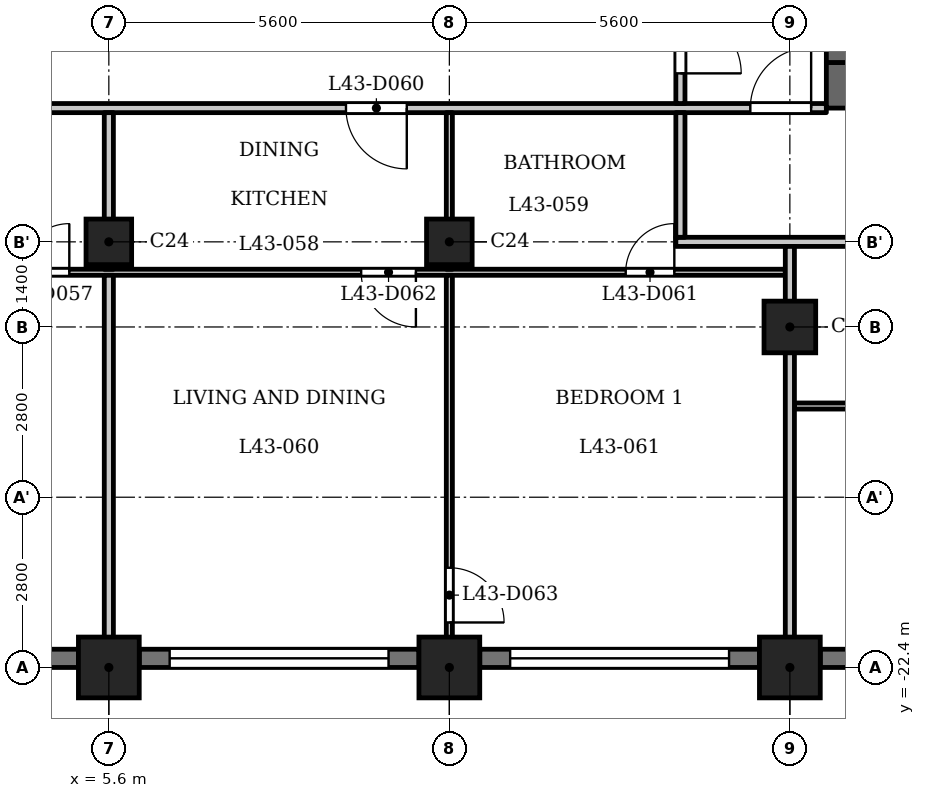
"""IFC4 building model, lengths in metres.
Left out: names, types, materials, properties, quantities, classifications, styles, units other than length and angle.
Written with IfcOpenShell. Run it as: python <this file> out.ifc"""

import sys

from ifc_helpers import new_model, si_unit, direction, frame, frame_2d, origin, origin_2d, place, context, subcontext, project, spatial, rectangle, extrude, element, fill, save


model = new_model("IFC4")
c1 = context("Model", 3, precision=1e-05, world=origin(), true_north=direction((0.0, 1.0)))
c2 = subcontext(c1, "Body", "Model", "MODEL_VIEW")
j1 = project(units=[si_unit("LENGTHUNIT", "METRE"), si_unit("PLANEANGLEUNIT", "RADIAN")], contexts=[c1])
p1 = place(None, origin())
s1 = spatial("IfcSite", under=j1, at=p1, CompositionType="ELEMENT")
p2 = place(p1, origin())
s2 = spatial("IfcBuilding", under=s1, at=p2, CompositionType="ELEMENT")
p3 = place(p2, frame((0.0, 0.0, 167.6)))
s3 = spatial("IfcBuildingStorey", under=s2, at=p3, CompositionType="ELEMENT", Elevation=167.6)
for number, where, z_axis, x_axis in (
    (1, (5.6, -22.4, 0.0), (0.0, 0.0, 1.0), (1.0, 0.0, 0.0)),
    (2, (11.2, -22.4, 0.0), (0.0, 0.0, 1.0), (1.0, 0.0, 0.0)),
    (3, (16.8, -22.4, 0.0), (0.0, 0.0, 1.0), (1.0, 0.0, 0.0)),
):
    element("IfcColumn", number, at=place(p3, frame(where, z_axis=z_axis, x_axis=x_axis)), inside=s3, PredefinedType="COLUMN", context=c2, shape_type="SweptSolid", body=[
        extrude(rectangle(XDim=1.0, YDim=1.0, at=origin_2d()), origin(), (0.0, 0.0, 1.0), 3.5),
    ])
p4 = place(p3, frame((16.8, -16.8, 0.0), z_axis=(0.0, 0.0, 1.0), x_axis=(1.0, 0.0, 0.0)))
e4 = element("IfcColumn", 4, at=p4, inside=s3, PredefinedType="COLUMN", context=c2, shape_type="SweptSolid", body=[
    extrude(rectangle(XDim=0.85, YDim=0.85, at=origin_2d()), origin(), (0.0, 0.0, 1.0), 3.5),
])
for number, where, z_axis, x_axis in (
    (5, (5.6, -15.4, 0.0), (0.0, 0.0, 1.0), (1.0, 0.0, 0.0)),
    (6, (11.2, -15.4, 0.0), (0.0, 0.0, 1.0), (1.0, 0.0, 0.0)),
):
    element("IfcColumn", number, at=place(p3, frame(where, z_axis=z_axis, x_axis=x_axis)), inside=s3, PredefinedType="COLUMN", context=c2, shape_type="SweptSolid", body=[
        extrude(rectangle(XDim=0.75, YDim=0.75, at=origin_2d()), origin(), (0.0, 0.0, 1.0), 3.5),
    ])
p5 = place(p3, frame((0.5, -22.25, 0.0), z_axis=(0.0, 0.0, 1.0), x_axis=(1.0, 0.0, 0.0)))
e7 = element("IfcWall", 7, at=p5, inside=s3, PredefinedType="SOLIDWALL", context=c2, shape_type="SweptSolid", body=[
    extrude(rectangle(XDim=4.6, YDim=0.3, at=frame_2d((2.3, 0.0))), origin(), (0.0, 0.0, 1.0), 2.45),
])
p6 = place(p5, frame((0.5, 0.0, 1.2)))
e8 = element("IfcOpeningElement", 8, at=p6, cuts=e7, PredefinedType="OPENING", context=c2, shape_type="SweptSolid", body=[
    extrude(rectangle(XDim=3.6, YDim=0.95, at=frame_2d((1.8, 0.475))), frame((0.0, 0.16, 0.0), z_axis=(0.0, -1.0, 0.0), x_axis=(1.0, 0.0, 0.0)), (0.0, 0.0, 1.0), 0.32),
])
p7 = place(p3, frame((6.1, -22.25, 0.0), z_axis=(0.0, 0.0, 1.0), x_axis=(1.0, 0.0, 0.0)))
e9 = element("IfcWall", 9, at=p7, inside=s3, PredefinedType="SOLIDWALL", context=c2, shape_type="SweptSolid", body=[
    extrude(rectangle(XDim=4.6, YDim=0.3, at=frame_2d((2.3, 0.0))), origin(), (0.0, 0.0, 1.0), 2.45),
])
p8 = place(p7, frame((0.5, 0.0, 1.2)))
e10 = element("IfcOpeningElement", 10, at=p8, cuts=e9, PredefinedType="OPENING", context=c2, shape_type="SweptSolid", body=[
    extrude(rectangle(XDim=3.6, YDim=0.95, at=frame_2d((1.8, 0.475))), frame((0.0, 0.16, 0.0), z_axis=(0.0, -1.0, 0.0), x_axis=(1.0, 0.0, 0.0)), (0.0, 0.0, 1.0), 0.32),
])
p9 = place(p3, frame((11.7, -22.25, 0.0), z_axis=(0.0, 0.0, 1.0), x_axis=(1.0, 0.0, 0.0)))
e11 = element("IfcWall", 11, at=p9, inside=s3, PredefinedType="SOLIDWALL", context=c2, shape_type="SweptSolid", body=[
    extrude(rectangle(XDim=4.6, YDim=0.3, at=frame_2d((2.3, 0.0))), origin(), (0.0, 0.0, 1.0), 2.45),
])
p10 = place(p9, frame((0.5, 0.0, 1.2)))
e12 = element("IfcOpeningElement", 12, at=p10, cuts=e11, PredefinedType="OPENING", context=c2, shape_type="SweptSolid", body=[
    extrude(rectangle(XDim=3.6, YDim=0.95, at=frame_2d((1.8, 0.475))), frame((0.0, 0.16, 0.0), z_axis=(0.0, -1.0, 0.0), x_axis=(1.0, 0.0, 0.0)), (0.0, 0.0, 1.0), 0.32),
])
p11 = place(p3, frame((17.3, -22.25, 0.0), z_axis=(0.0, 0.0, 1.0), x_axis=(1.0, 0.0, 0.0)))
e13 = element("IfcWall", 13, at=p11, inside=s3, PredefinedType="SOLIDWALL", context=c2, shape_type="SweptSolid", body=[
    extrude(rectangle(XDim=2.7, YDim=0.3, at=frame_2d((1.35, 0.0))), origin(), (0.0, 0.0, 1.0), 2.45),
])
p12 = place(p11, frame((0.45, 0.0, 0.9)))
e14 = element("IfcOpeningElement", 14, at=p12, cuts=e13, PredefinedType="OPENING", context=c2, shape_type="SweptSolid", body=[
    extrude(rectangle(XDim=1.8, YDim=1.25, at=frame_2d((0.9, 0.625))), frame((0.0, 0.16, 0.0), z_axis=(0.0, -1.0, 0.0), x_axis=(1.0, 0.0, 0.0)), (0.0, 0.0, 1.0), 0.32),
])
p13 = place(p3, frame((17.4, -12.825, 0.0), z_axis=(0.0, 0.0, 1.0), x_axis=(1.0, 0.0, 0.0)))
e15 = element("IfcWall", 15, at=p13, inside=s3, PredefinedType="SHEAR", context=c2, shape_type="SweptSolid", body=[
    extrude(rectangle(XDim=10.4, YDim=0.75, at=frame_2d((5.2, 0.0))), origin(), (0.0, 0.0, 1.0), 3.2),
])
p14 = place(p3, frame((17.6, -12.45, 0.0), z_axis=(0.0, 0.0, 1.0), x_axis=(0.0, 1.0, 0.0)))
e16 = element("IfcWall", 16, at=p14, inside=s3, PredefinedType="SHEAR", context=c2, shape_type="SweptSolid", body=[
    extrude(rectangle(XDim=24.9, YDim=0.4, at=frame_2d((12.45, 0.0))), origin(), (0.0, 0.0, 1.0), 3.2),
])
p15 = place(p14, frame((8.65, 0.0, 0.0)))
e17 = element("IfcOpeningElement", 17, at=p15, cuts=e16, PredefinedType="OPENING", context=c2, shape_type="SweptSolid", body=[
    extrude(rectangle(XDim=0.9, YDim=2.1, at=frame_2d((0.45, 1.05))), frame((0.0, 0.21, 0.0), z_axis=(0.0, -1.0, 0.0), x_axis=(1.0, 0.0, 0.0)), (0.0, 0.0, 1.0), 0.42),
])
p16 = place(p14, frame((15.6, 0.0, 0.0)))
e18 = element("IfcOpeningElement", 18, at=p16, cuts=e16, PredefinedType="OPENING", context=c2, shape_type="SweptSolid", body=[
    extrude(rectangle(XDim=1.1, YDim=2.1, at=frame_2d((0.55, 1.05))), frame((0.0, 0.21, 0.0), z_axis=(0.0, -1.0, 0.0), x_axis=(1.0, 0.0, 0.0)), (0.0, 0.0, 1.0), 0.42),
])
p17 = place(p14, frame((18.0, 0.0, 0.0)))
e19 = element("IfcOpeningElement", 19, at=p17, cuts=e16, PredefinedType="OPENING", context=c2, shape_type="SweptSolid", body=[
    extrude(rectangle(XDim=1.1, YDim=2.1, at=frame_2d((0.55, 1.05))), frame((0.0, 0.21, 0.0), z_axis=(0.0, -1.0, 0.0), x_axis=(1.0, 0.0, 0.0)), (0.0, 0.0, 1.0), 0.42),
])
p18 = place(p14, frame((23.025, 0.0, 0.0)))
e20 = element("IfcOpeningElement", 20, at=p18, cuts=e16, PredefinedType="OPENING", context=c2, shape_type="SweptSolid", body=[
    extrude(rectangle(XDim=1.1, YDim=2.1, at=frame_2d((0.55, 1.05))), frame((0.0, 0.21, 0.0), z_axis=(0.0, -1.0, 0.0), x_axis=(1.0, 0.0, 0.0)), (0.0, 0.0, 1.0), 0.42),
])
p19 = place(p14, frame((0.775, 0.0, 0.0)))
e21 = element("IfcOpeningElement", 21, at=p19, cuts=e16, PredefinedType="OPENING", context=c2, shape_type="SweptSolid", body=[
    extrude(rectangle(XDim=1.1, YDim=2.1, at=frame_2d((0.55, 1.05))), frame((0.0, 0.21, 0.0), z_axis=(0.0, -1.0, 0.0), x_axis=(1.0, 0.0, 0.0)), (0.0, 0.0, 1.0), 0.42),
])
p20 = place(p14, frame((12.925, 0.0, 0.0)))
e22 = element("IfcOpeningElement", 22, at=p20, cuts=e16, PredefinedType="OPENING", context=c2, shape_type="SweptSolid", body=[
    extrude(rectangle(XDim=1.8, YDim=2.1, at=frame_2d((0.9, 1.05))), frame((0.0, 0.21, 0.0), z_axis=(0.0, -1.0, 0.0), x_axis=(1.0, 0.0, 0.0)), (0.0, 0.0, 1.0), 0.42),
])
p21 = place(p3, frame((16.875, -18.1, 0.0), z_axis=(0.0, 0.0, 1.0), x_axis=(1.0, 0.0, 0.0)))
e23 = element("IfcWall", 23, at=p21, inside=s3, PredefinedType="PARTITIONING", context=c2, shape_type="SweptSolid", body=[
    extrude(rectangle(XDim=9.565, YDim=0.1, at=frame_2d((4.782, 0.0))), origin(), (0.0, 0.0, 1.0), 3.2),
])
p22 = place(p21, frame((7.639, 0.0, 0.0)))
e24 = element("IfcOpeningElement", 24, at=p22, cuts=e23, PredefinedType="OPENING", context=c2, shape_type="SweptSolid", body=[
    extrude(rectangle(XDim=0.8, YDim=2.1, at=frame_2d((0.4, 1.05))), frame((0.0, 0.06, 0.0), z_axis=(0.0, -1.0, 0.0), x_axis=(1.0, 0.0, 0.0)), (0.0, 0.0, 1.0), 0.12),
])
p23 = place(p21, frame((4.075, 0.0, 0.0)))
e25 = element("IfcOpeningElement", 25, at=p23, cuts=e23, PredefinedType="OPENING", context=c2, shape_type="SweptSolid", body=[
    extrude(rectangle(XDim=0.9, YDim=2.1, at=frame_2d((0.45, 1.05))), frame((0.0, 0.06, 0.0), z_axis=(0.0, -1.0, 0.0), x_axis=(1.0, 0.0, 0.0)), (0.0, 0.0, 1.0), 0.12),
])
p24 = place(p3, frame((-16.725, -15.9, 0.0), z_axis=(0.0, 0.0, 1.0), x_axis=(1.0, 0.0, 0.0)))
e26 = element("IfcWall", 26, at=p24, inside=s3, PredefinedType="PARTITIONING", context=c2, shape_type="SweptSolid", body=[
    extrude(rectangle(XDim=33.45, YDim=0.1, at=frame_2d((16.725, 0.0))), origin(), (0.0, 0.0, 1.0), 3.2),
])
p25 = place(p24, frame((9.675, 0.0, 0.0)))
e27 = element("IfcOpeningElement", 27, at=p25, cuts=e26, PredefinedType="OPENING", context=c2, shape_type="SweptSolid", body=[
    extrude(rectangle(XDim=0.8, YDim=2.1, at=frame_2d((0.4, 1.05))), frame((0.0, 0.06, 0.0), z_axis=(0.0, -1.0, 0.0), x_axis=(1.0, 0.0, 0.0)), (0.0, 0.0, 1.0), 0.12),
])
p26 = place(p24, frame((4.075, 0.0, 0.0)))
e28 = element("IfcOpeningElement", 28, at=p26, cuts=e26, PredefinedType="OPENING", context=c2, shape_type="SweptSolid", body=[
    extrude(rectangle(XDim=0.9, YDim=2.1, at=frame_2d((0.45, 1.05))), frame((0.0, 0.06, 0.0), z_axis=(0.0, -1.0, 0.0), x_axis=(1.0, 0.0, 0.0)), (0.0, 0.0, 1.0), 0.12),
])
p27 = place(p24, frame((20.875, 0.0, 0.0)))
e29 = element("IfcOpeningElement", 29, at=p27, cuts=e26, PredefinedType="OPENING", context=c2, shape_type="SweptSolid", body=[
    extrude(rectangle(XDim=0.8, YDim=2.1, at=frame_2d((0.4, 1.05))), frame((0.0, 0.06, 0.0), z_axis=(0.0, -1.0, 0.0), x_axis=(1.0, 0.0, 0.0)), (0.0, 0.0, 1.0), 0.12),
])
p28 = place(p24, frame((15.275, 0.0, 0.0)))
e30 = element("IfcOpeningElement", 30, at=p28, cuts=e26, PredefinedType="OPENING", context=c2, shape_type="SweptSolid", body=[
    extrude(rectangle(XDim=0.9, YDim=2.1, at=frame_2d((0.45, 1.05))), frame((0.0, 0.06, 0.0), z_axis=(0.0, -1.0, 0.0), x_axis=(1.0, 0.0, 0.0)), (0.0, 0.0, 1.0), 0.12),
])
p29 = place(p24, frame((30.825, 0.0, 0.0)))
e31 = element("IfcOpeningElement", 31, at=p29, cuts=e26, PredefinedType="OPENING", context=c2, shape_type="SweptSolid", body=[
    extrude(rectangle(XDim=0.8, YDim=2.1, at=frame_2d((0.4, 1.05))), frame((0.0, 0.06, 0.0), z_axis=(0.0, -1.0, 0.0), x_axis=(1.0, 0.0, 0.0)), (0.0, 0.0, 1.0), 0.12),
])
p30 = place(p24, frame((26.475, 0.0, 0.0)))
e32 = element("IfcOpeningElement", 32, at=p30, cuts=e26, PredefinedType="OPENING", context=c2, shape_type="SweptSolid", body=[
    extrude(rectangle(XDim=0.9, YDim=2.1, at=frame_2d((0.45, 1.05))), frame((0.0, 0.06, 0.0), z_axis=(0.0, -1.0, 0.0), x_axis=(1.0, 0.0, 0.0)), (0.0, 0.0, 1.0), 0.12),
])
p31 = place(p3, frame((14.925, -15.4, 0.0), z_axis=(0.0, 0.0, 1.0), x_axis=(1.0, 0.0, 0.0)))
e33 = element("IfcWall", 33, at=p31, inside=s3, PredefinedType="PARTITIONING", context=c2, shape_type="SweptSolid", body=[
    extrude(rectangle(XDim=12.559, YDim=0.15, at=frame_2d((6.279, 0.0))), origin(), (0.0, 0.0, 1.0), 3.2),
])
p32 = place(p31, frame((5.775, 0.0, 0.0)))
e34 = element("IfcOpeningElement", 34, at=p32, cuts=e33, PredefinedType="OPENING", context=c2, shape_type="SweptSolid", body=[
    extrude(rectangle(XDim=1.0, YDim=2.1, at=frame_2d((0.5, 1.05))), frame((0.0, 0.085, 0.0), z_axis=(0.0, -1.0, 0.0), x_axis=(1.0, 0.0, 0.0)), (0.0, 0.0, 1.0), 0.17),
])
p33 = place(p3, frame((-17.4, -13.2, 0.0), z_axis=(0.0, 0.0, 1.0), x_axis=(1.0, 0.0, 0.0)))
e35 = element("IfcWall", 35, at=p33, inside=s3, PredefinedType="PARTITIONING", context=c2, shape_type="SweptSolid", body=[
    extrude(rectangle(XDim=34.8, YDim=0.15, at=frame_2d((17.4, 0.0))), origin(), (0.0, 0.0, 1.0), 3.2),
])
p34 = place(p33, frame((0.15, 0.0, 0.0)))
e36 = element("IfcOpeningElement", 36, at=p34, cuts=e35, PredefinedType="OPENING", context=c2, shape_type="SweptSolid", body=[
    extrude(rectangle(XDim=1.0, YDim=2.1, at=frame_2d((0.5, 1.05))), frame((0.0, 0.085, 0.0), z_axis=(0.0, -1.0, 0.0), x_axis=(1.0, 0.0, 0.0)), (0.0, 0.0, 1.0), 0.17),
])
p35 = place(p33, frame((33.55, 0.0, 0.0)))
e37 = element("IfcOpeningElement", 37, at=p35, cuts=e35, PredefinedType="OPENING", context=c2, shape_type="SweptSolid", body=[
    extrude(rectangle(XDim=1.0, YDim=2.1, at=frame_2d((0.5, 1.05))), frame((0.0, 0.085, 0.0), z_axis=(0.0, -1.0, 0.0), x_axis=(1.0, 0.0, 0.0)), (0.0, 0.0, 1.0), 0.17),
])
p36 = place(p33, frame((15.7, 0.0, 0.0)))
e38 = element("IfcOpeningElement", 38, at=p36, cuts=e35, PredefinedType="OPENING", context=c2, shape_type="SweptSolid", body=[
    extrude(rectangle(XDim=1.0, YDim=2.1, at=frame_2d((0.5, 1.05))), frame((0.0, 0.085, 0.0), z_axis=(0.0, -1.0, 0.0), x_axis=(1.0, 0.0, 0.0)), (0.0, 0.0, 1.0), 0.17),
])
p37 = place(p33, frame((26.9, 0.0, 0.0)))
e39 = element("IfcOpeningElement", 39, at=p37, cuts=e35, PredefinedType="OPENING", context=c2, shape_type="SweptSolid", body=[
    extrude(rectangle(XDim=1.0, YDim=2.1, at=frame_2d((0.5, 1.05))), frame((0.0, 0.085, 0.0), z_axis=(0.0, -1.0, 0.0), x_axis=(1.0, 0.0, 0.0)), (0.0, 0.0, 1.0), 0.17),
])
p38 = place(p3, frame((5.6, -22.88, 0.0), z_axis=(0.0, 0.0, 1.0), x_axis=(0.0, 1.0, 0.0)))
e40 = element("IfcWall", 40, at=p38, inside=s3, PredefinedType="PARTITIONING", context=c2, shape_type="SweptSolid", body=[
    extrude(rectangle(XDim=6.93, YDim=0.15, at=frame_2d((3.465, 0.0))), origin(), (0.0, 0.0, 1.0), 3.2),
])
p39 = place(p3, frame((5.6, -15.85, 0.0), z_axis=(0.0, 0.0, 1.0), x_axis=(0.0, 1.0, 0.0)))
e41 = element("IfcWall", 41, at=p39, inside=s3, PredefinedType="PARTITIONING", context=c2, shape_type="SweptSolid", body=[
    extrude(rectangle(XDim=2.575, YDim=0.15, at=frame_2d((1.288, 0.0))), origin(), (0.0, 0.0, 1.0), 3.2),
])
p40 = place(p3, frame((11.2, -22.88, 0.0), z_axis=(0.0, 0.0, 1.0), x_axis=(0.0, 1.0, 0.0)))
e42 = element("IfcWall", 42, at=p40, inside=s3, PredefinedType="PARTITIONING", context=c2, shape_type="SweptSolid", body=[
    extrude(rectangle(XDim=6.93, YDim=0.1, at=frame_2d((3.465, 0.0))), origin(), (0.0, 0.0, 1.0), 3.2),
])
p41 = place(p40, frame((1.22, 0.0, 0.0)))
e43 = element("IfcOpeningElement", 43, at=p41, cuts=e42, PredefinedType="OPENING", context=c2, shape_type="SweptSolid", body=[
    extrude(rectangle(XDim=0.9, YDim=2.1, at=frame_2d((0.45, 1.05))), frame((0.0, 0.06, 0.0), z_axis=(0.0, -1.0, 0.0), x_axis=(1.0, 0.0, 0.0)), (0.0, 0.0, 1.0), 0.12),
])
p42 = place(p3, frame((11.2, -15.85, 0.0), z_axis=(0.0, 0.0, 1.0), x_axis=(0.0, 1.0, 0.0)))
e44 = element("IfcWall", 44, at=p42, inside=s3, PredefinedType="PARTITIONING", context=c2, shape_type="SweptSolid", body=[
    extrude(rectangle(XDim=2.575, YDim=0.1, at=frame_2d((1.288, 0.0))), origin(), (0.0, 0.0, 1.0), 3.2),
])
p43 = place(p3, frame((15.0, -15.325, 0.0), z_axis=(0.0, 0.0, 1.0), x_axis=(0.0, 1.0, 0.0)))
e45 = element("IfcWall", 45, at=p43, inside=s3, PredefinedType="PARTITIONING", context=c2, shape_type="SweptSolid", body=[
    extrude(rectangle(XDim=2.05, YDim=0.15, at=frame_2d((1.025, 0.0))), origin(), (0.0, 0.0, 1.0), 3.2),
])
p44 = place(p3, frame((15.0, -13.125, 0.0), z_axis=(0.0, 0.0, 1.0), x_axis=(0.0, 1.0, 0.0)))
e46 = element("IfcWall", 46, at=p44, inside=s3, PredefinedType="PARTITIONING", context=c2, shape_type="SweptSolid", body=[
    extrude(rectangle(XDim=6.356, YDim=0.15, at=frame_2d((3.178, 0.0))), origin(), (0.0, 0.0, 1.0), 3.2),
])
p45 = place(p44, frame((0.496, 0.0, 0.0)))
e47 = element("IfcOpeningElement", 47, at=p45, cuts=e46, PredefinedType="OPENING", context=c2, shape_type="SweptSolid", body=[
    extrude(rectangle(XDim=1.0, YDim=2.1, at=frame_2d((0.5, 1.05))), frame((0.0, 0.085, 0.0), z_axis=(0.0, -1.0, 0.0), x_axis=(1.0, 0.0, 0.0)), (0.0, 0.0, 1.0), 0.17),
])
p46 = place(p3, frame((16.8, -22.88, 0.0), z_axis=(0.0, 0.0, 1.0), x_axis=(0.0, 1.0, 0.0)))
e48 = element("IfcWall", 48, at=p46, inside=s3, PredefinedType="PARTITIONING", context=c2, shape_type="SweptSolid", body=[
    extrude(rectangle(XDim=7.405, YDim=0.15, at=frame_2d((3.702, 0.0))), origin(), (0.0, 0.0, 1.0), 3.2),
])
p47 = place(p45, origin())
e49 = element("IfcDoor", 49, at=p47, inside=s3, OperationType="SINGLE_SWING_LEFT", PredefinedType="DOOR", context=c2, shape_type="SweptSolid", body=[
    extrude(rectangle(XDim=1.0, YDim=2.1, at=frame_2d((0.5, 1.05))), frame((0.0, 0.025, 0.0), z_axis=(0.0, -1.0, 0.0), x_axis=(1.0, 0.0, 0.0)), (0.0, 0.0, 1.0), 0.05),
])
fill(e47, e49)
p48 = place(p35, origin())
e50 = element("IfcDoor", 50, at=p48, inside=s3, OperationType="SINGLE_SWING_LEFT", PredefinedType="DOOR", context=c2, shape_type="SweptSolid", body=[
    extrude(rectangle(XDim=1.0, YDim=2.1, at=frame_2d((0.5, 1.05))), frame((0.0, 0.025, 0.0), z_axis=(0.0, -1.0, 0.0), x_axis=(1.0, 0.0, 0.0)), (0.0, 0.0, 1.0), 0.05),
])
fill(e37, e50)
p49 = place(p27, origin())
e51 = element("IfcDoor", 51, at=p49, inside=s3, OperationType="SINGLE_SWING_LEFT", PredefinedType="DOOR", context=c2, shape_type="SweptSolid", body=[
    extrude(rectangle(XDim=0.8, YDim=2.1, at=frame_2d((0.4, 1.05))), frame((0.0, 0.025, 0.0), z_axis=(0.0, -1.0, 0.0), x_axis=(1.0, 0.0, 0.0)), (0.0, 0.0, 1.0), 0.05),
])
fill(e29, e51)
p50 = place(p37, origin())
e52 = element("IfcDoor", 52, at=p50, inside=s3, OperationType="SINGLE_SWING_RIGHT", PredefinedType="DOOR", context=c2, shape_type="SweptSolid", body=[
    extrude(rectangle(XDim=1.0, YDim=2.1, at=frame_2d((0.5, 1.05))), frame((0.0, 0.025, 0.0), z_axis=(0.0, -1.0, 0.0), x_axis=(1.0, 0.0, 0.0)), (0.0, 0.0, 1.0), 0.05),
])
fill(e39, e52)
p51 = place(p29, origin())
e53 = element("IfcDoor", 53, at=p51, inside=s3, OperationType="SINGLE_SWING_LEFT", PredefinedType="DOOR", context=c2, shape_type="SweptSolid", body=[
    extrude(rectangle(XDim=0.8, YDim=2.1, at=frame_2d((0.4, 1.05))), frame((0.0, 0.025, 0.0), z_axis=(0.0, -1.0, 0.0), x_axis=(1.0, 0.0, 0.0)), (0.0, 0.0, 1.0), 0.05),
])
fill(e31, e53)
p52 = place(p30, origin())
e54 = element("IfcDoor", 54, at=p52, inside=s3, OperationType="SINGLE_SWING_RIGHT", PredefinedType="DOOR", context=c2, shape_type="SweptSolid", body=[
    extrude(rectangle(XDim=0.9, YDim=2.1, at=frame_2d((0.45, 1.05))), frame((0.0, 0.025, 0.0), z_axis=(0.0, -1.0, 0.0), x_axis=(1.0, 0.0, 0.0)), (0.0, 0.0, 1.0), 0.05),
])
fill(e32, e54)
p53 = place(p41, origin())
e55 = element("IfcDoor", 55, at=p53, inside=s3, OperationType="SINGLE_SWING_LEFT", PredefinedType="DOOR", context=c2, shape_type="SweptSolid", body=[
    extrude(rectangle(XDim=0.9, YDim=2.1, at=frame_2d((0.45, 1.05))), frame((0.0, 0.025, 0.0), z_axis=(0.0, -1.0, 0.0), x_axis=(1.0, 0.0, 0.0)), (0.0, 0.0, 1.0), 0.05),
])
fill(e43, e55)
p54 = place(p8, origin())
e56 = element("IfcWindow", 56, at=p54, inside=s3, PartitioningType="SINGLE_PANEL", PredefinedType="WINDOW", context=c2, shape_type="SweptSolid", body=[
    extrude(rectangle(XDim=3.6, YDim=0.95, at=frame_2d((1.8, 0.475))), frame((0.0, 0.03, 0.0), z_axis=(0.0, -1.0, 0.0), x_axis=(1.0, 0.0, 0.0)), (0.0, 0.0, 1.0), 0.06),
])
fill(e10, e56)
p55 = place(p10, origin())
e57 = element("IfcWindow", 57, at=p55, inside=s3, PartitioningType="SINGLE_PANEL", PredefinedType="WINDOW", context=c2, shape_type="SweptSolid", body=[
    extrude(rectangle(XDim=3.6, YDim=0.95, at=frame_2d((1.8, 0.475))), frame((0.0, 0.03, 0.0), z_axis=(0.0, -1.0, 0.0), x_axis=(1.0, 0.0, 0.0)), (0.0, 0.0, 1.0), 0.06),
])
fill(e12, e57)
save(model, sys.argv[1])
